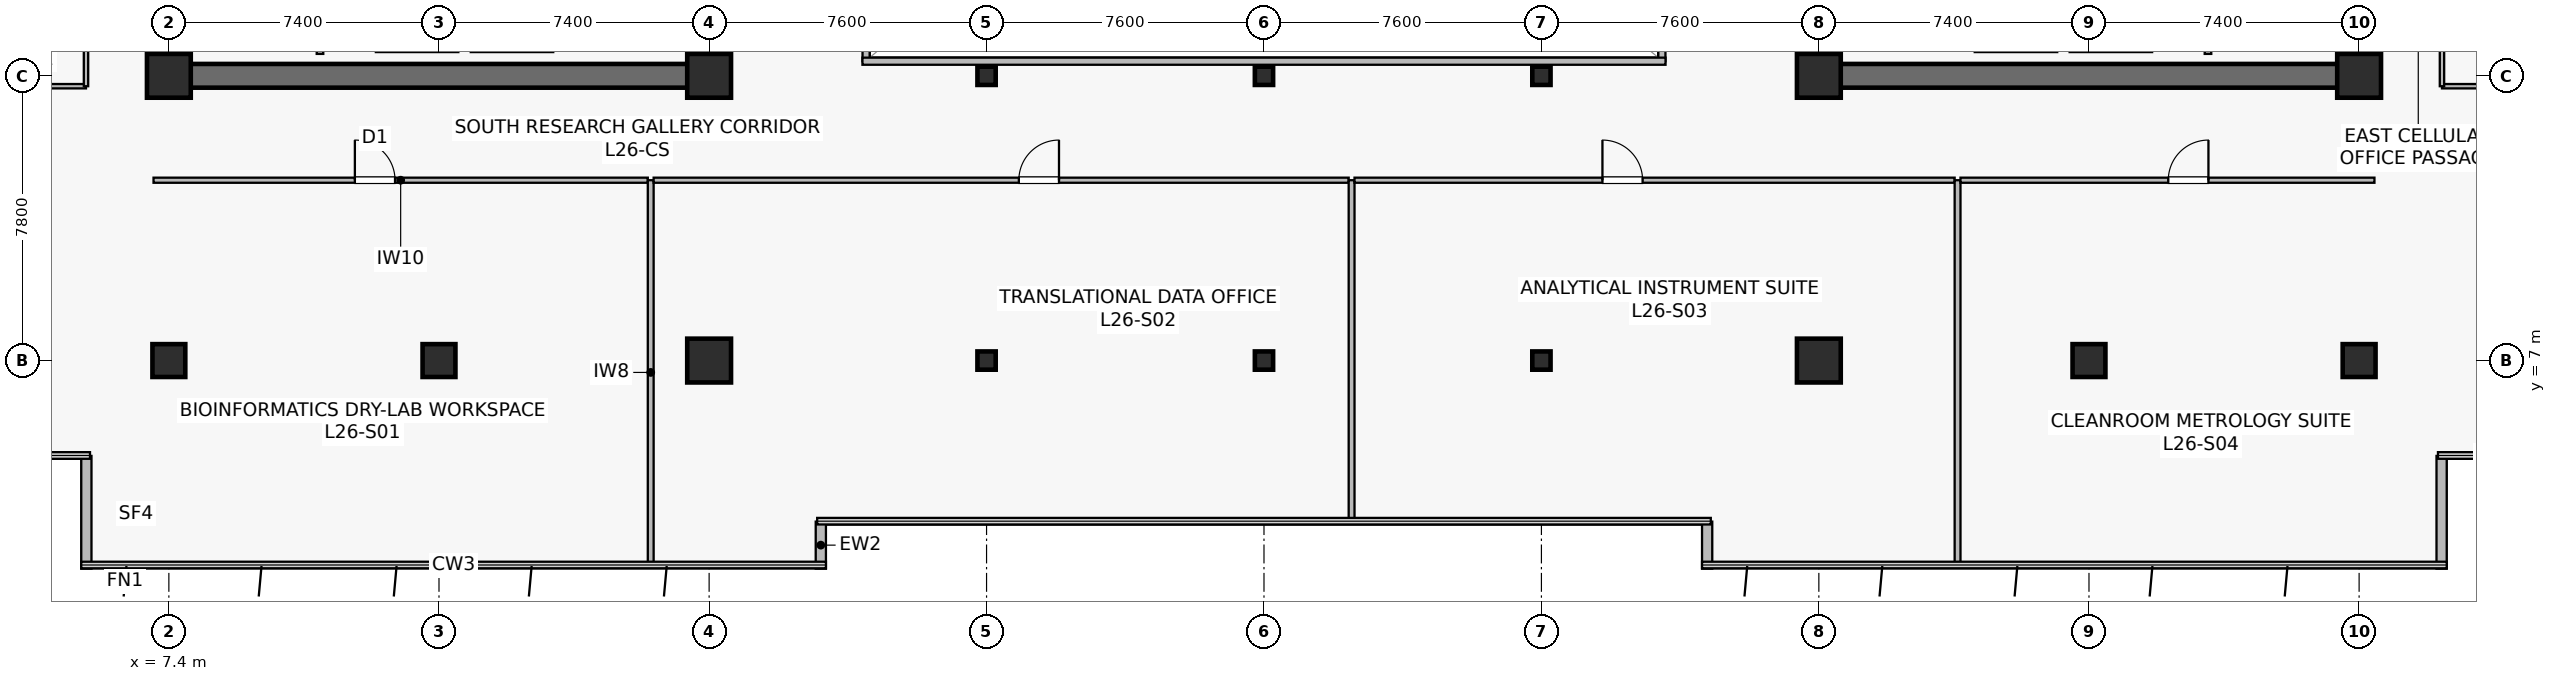
"""IFC4 building model, lengths in metres.
Left out: names, types, materials, properties, quantities, classifications, styles, units other than length and angle.
Written with IfcOpenShell. Run it as: python <this file> out.ifc"""

import sys

from ifc_helpers import new_model, si_unit, direction, frame, frame_2d, origin, origin_2d, place, context, subcontext, project, spatial, rectangle, hollow_rectangle, extrude, source, transform, mapped, element, fill, save


model = new_model("IFC4")
c1 = context("Model", 3, precision=1e-05, world=origin(), true_north=direction((0.0, 1.0)))
c2 = subcontext(c1, "Body", "Model", "MODEL_VIEW")
j1 = project(units=[si_unit("LENGTHUNIT", "METRE"), si_unit("PLANEANGLEUNIT", "RADIAN")], contexts=[c1])
p1 = place(None, origin())
s1 = spatial("IfcSite", under=j1, at=p1, CompositionType="ELEMENT")
p2 = place(p1, origin())
s2 = spatial("IfcBuilding", under=s1, at=p2, CompositionType="ELEMENT")
p3 = place(p2, frame((0.0, 0.0, 109.2)))
s3 = spatial("IfcBuildingStorey", under=s2, at=p3, CompositionType="ELEMENT", Elevation=109.2)
p4 = place(p3, frame((7.075, 14.8, 0.0), z_axis=(0.0, 0.0, 1.0), x_axis=(1.0, 0.0, 0.0)))
e1 = element("IfcWall", 1, at=p4, inside=s3, PredefinedType="SHEAR", context=c2, shape_type="SweptSolid", body=[
    extrude(rectangle(XDim=15.45, YDim=0.65, at=frame_2d((7.725, 0.0))), origin(), (0.0, 0.0, 1.0), 3.79),
])
p5 = place(p3, frame((7.4, 15.125, 0.0), z_axis=(0.0, 0.0, 1.0), x_axis=(0.0, 1.0, 0.0)))
e2 = element("IfcWall", 2, at=p5, inside=s3, PredefinedType="SHEAR", context=c2, shape_type="SweptSolid", body=[
    extrude(rectangle(XDim=18.35, YDim=0.65, at=frame_2d((9.175, 0.0))), origin(), (0.0, 0.0, 1.0), 3.79),
])
p6 = place(p3, frame((22.2, 15.125, 0.0), z_axis=(0.0, 0.0, 1.0), x_axis=(0.0, 1.0, 0.0)))
e3 = element("IfcWall", 3, at=p6, inside=s3, PredefinedType="SHEAR", context=c2, shape_type="SweptSolid", body=[
    extrude(rectangle(XDim=18.35, YDim=0.65, at=frame_2d((9.175, 0.0))), origin(), (0.0, 0.0, 1.0), 3.79),
])
p7 = place(p6, frame((3.425, 0.0, 0.0)))
e4 = element("IfcOpeningElement", 4, at=p7, cuts=e3, PredefinedType="OPENING", context=c2, shape_type="SweptSolid", body=[
    extrude(rectangle(XDim=1.42, YDim=2.2, at=frame_2d((0.71, 1.1))), frame((0.0, 0.335, 0.0), z_axis=(0.0, -1.0, 0.0), x_axis=(1.0, 0.0, 0.0)), (0.0, 0.0, 1.0), 0.67),
])
p8 = place(p3, frame((52.275, 14.8, 0.0), z_axis=(0.0, 0.0, 1.0), x_axis=(1.0, 0.0, 0.0)))
e5 = element("IfcWall", 5, at=p8, inside=s3, PredefinedType="SHEAR", context=c2, shape_type="SweptSolid", body=[
    extrude(rectangle(XDim=15.45, YDim=0.65, at=frame_2d((7.725, 0.0))), origin(), (0.0, 0.0, 1.0), 3.79),
])
p9 = place(p3, frame((52.6, 15.125, 0.0), z_axis=(0.0, 0.0, 1.0), x_axis=(0.0, 1.0, 0.0)))
e6 = element("IfcWall", 6, at=p9, inside=s3, PredefinedType="SHEAR", context=c2, shape_type="SweptSolid", body=[
    extrude(rectangle(XDim=18.35, YDim=0.65, at=frame_2d((9.175, 0.0))), origin(), (0.0, 0.0, 1.0), 3.79),
])
p10 = place(p9, frame((3.425, 0.0, 0.0)))
e7 = element("IfcOpeningElement", 7, at=p10, cuts=e6, PredefinedType="OPENING", context=c2, shape_type="SweptSolid", body=[
    extrude(rectangle(XDim=1.42, YDim=2.2, at=frame_2d((0.71, 1.1))), frame((0.0, 0.335, 0.0), z_axis=(0.0, -1.0, 0.0), x_axis=(1.0, 0.0, 0.0)), (0.0, 0.0, 1.0), 0.67),
])
p11 = place(p3, frame((67.4, 15.125, 0.0), z_axis=(0.0, 0.0, 1.0), x_axis=(0.0, 1.0, 0.0)))
e8 = element("IfcWall", 8, at=p11, inside=s3, PredefinedType="SHEAR", context=c2, shape_type="SweptSolid", body=[
    extrude(rectangle(XDim=18.35, YDim=0.65, at=frame_2d((9.175, 0.0))), origin(), (0.0, 0.0, 1.0), 3.79),
])
m1 = source(origin(), c2, "Body", "SweptSolid", [
    extrude(rectangle(XDim=0.9, YDim=0.9, at=origin_2d()), origin(), (0.0, 0.0, 1.0), 4.1),
])
p12 = place(p3, frame((14.8, 7.0, 0.0), z_axis=(0.0, 0.0, 1.0), x_axis=(1.0, 0.0, 0.0)))
e9 = element("IfcColumn", 9, at=p12, inside=s3, PredefinedType="COLUMN", context=c2, shape_type="MappedRepresentation", body=[
    mapped(m1, transform((0.0, 0.0, 0.0), scale=1.0)),
])
m2 = source(origin(), c2, "Body", "SweptSolid", [
    extrude(rectangle(XDim=1.2, YDim=1.2, at=origin_2d()), origin(), (0.0, 0.0, 1.0), 4.1),
])
for number, where, z_axis, x_axis in (
    (10, (22.2, 7.0, 0.0), (0.0, 0.0, 1.0), (1.0, 0.0, 0.0)),
    (11, (7.4, 14.8, 0.0), (0.0, 0.0, 1.0), (1.0, 0.0, 0.0)),
    (12, (22.2, 14.8, 0.0), (0.0, 0.0, 1.0), (1.0, 0.0, 0.0)),
    (13, (52.6, 7.0, 0.0), (0.0, 0.0, 1.0), (1.0, 0.0, 0.0)),
):
    element("IfcColumn", number, at=place(p3, frame(where, z_axis=z_axis, x_axis=x_axis)), inside=s3, PredefinedType="COLUMN", context=c2, shape_type="MappedRepresentation", body=[
        mapped(m2, transform((0.0, 0.0, 0.0), scale=1.0)),
    ])
p13 = place(p3, frame((60.0, 7.0, 0.0), z_axis=(0.0, 0.0, 1.0), x_axis=(1.0, 0.0, 0.0)))
e14 = element("IfcColumn", 14, at=p13, inside=s3, PredefinedType="COLUMN", context=c2, shape_type="MappedRepresentation", body=[
    mapped(m1, transform((0.0, 0.0, 0.0), scale=1.0)),
])
for number, where, z_axis, x_axis in (
    (15, (52.6, 14.8, 0.0), (0.0, 0.0, 1.0), (1.0, 0.0, 0.0)),
    (16, (67.4, 14.8, 0.0), (0.0, 0.0, 1.0), (1.0, 0.0, 0.0)),
):
    element("IfcColumn", number, at=place(p3, frame(where, z_axis=z_axis, x_axis=x_axis)), inside=s3, PredefinedType="COLUMN", context=c2, shape_type="MappedRepresentation", body=[
        mapped(m2, transform((0.0, 0.0, 0.0), scale=1.0)),
    ])
for number, where, z_axis, x_axis in (
    (17, (7.4, 7.0, 0.0), (0.0, 0.0, 1.0), (1.0, 0.0, 0.0)),
    (18, (67.4, 7.0, 0.0), (0.0, 0.0, 1.0), (1.0, 0.0, 0.0)),
):
    element("IfcColumn", number, at=place(p3, frame(where, z_axis=z_axis, x_axis=x_axis)), inside=s3, PredefinedType="COLUMN", context=c2, shape_type="MappedRepresentation", body=[
        mapped(m1, transform((0.0, 0.0, 0.0), scale=1.0)),
    ])
m3 = source(origin(), c2, "Body", "SweptSolid", [
    extrude(hollow_rectangle(XDim=0.5, YDim=0.5, WallThickness=0.022, at=origin_2d()), origin(), (0.0, 0.0, 1.0), 4.1),
])
for number, where, z_axis, x_axis in (
    (19, (29.8, 7.0, 0.0), (0.0, 0.0, 1.0), (1.0, 0.0, 0.0)),
    (20, (29.8, 14.8, 0.0), (0.0, 0.0, 1.0), (1.0, 0.0, 0.0)),
    (21, (37.4, 7.0, 0.0), (0.0, 0.0, 1.0), (1.0, 0.0, 0.0)),
    (22, (37.4, 14.8, 0.0), (0.0, 0.0, 1.0), (1.0, 0.0, 0.0)),
    (23, (45.0, 7.0, 0.0), (0.0, 0.0, 1.0), (1.0, 0.0, 0.0)),
    (24, (45.0, 14.8, 0.0), (0.0, 0.0, 1.0), (1.0, 0.0, 0.0)),
):
    element("IfcColumn", number, at=place(p3, frame(where, z_axis=z_axis, x_axis=x_axis)), inside=s3, PredefinedType="COLUMN", context=c2, shape_type="MappedRepresentation", body=[
        mapped(m3, transform((0.0, 0.0, 0.0), scale=1.0)),
    ])
for number, where, z_axis, x_axis in (
    (25, (25.26, 1.3, 0.0), (0.0, 0.0, 1.0), (0.0, 1.0, 0.0)),
    (26, (49.54, 2.588, 0.0), (0.0, 0.0, 1.0), (0.0, -1.0, 0.0)),
):
    element("IfcWall", number, at=place(p3, frame(where, z_axis=z_axis, x_axis=x_axis)), inside=s3, PredefinedType="STANDARD", context=c2, shape_type="SweptSolid", body=[
        extrude(rectangle(XDim=1.288, YDim=0.28, at=frame_2d((0.644, 0.0))), origin(), (0.0, 0.0, 1.0), 3.79),
    ])
for number, where, z_axis, x_axis in (
    (27, (69.66, 1.3, 0.0), (0.0, 0.0, 1.0), (0.0, 1.0, 0.0)),
    (28, (5.14, 4.388, 0.0), (0.0, 0.0, 1.0), (0.0, -1.0, 0.0)),
):
    element("IfcWall", number, at=place(p3, frame(where, z_axis=z_axis, x_axis=x_axis)), inside=s3, PredefinedType="STANDARD", context=c2, shape_type="SweptSolid", body=[
        extrude(rectangle(XDim=3.088, YDim=0.28, at=frame_2d((1.544, 0.0))), origin(), (0.0, 0.0, 1.0), 3.79),
    ])
p14 = place(p3, frame((13.07, 15.55, 0.0), z_axis=(0.0, 0.0, 1.0), x_axis=(1.0, 0.0, 0.0)))
e29 = element("IfcWall", 29, at=p14, inside=s3, PredefinedType="SOLIDWALL", context=c2, shape_type="SweptSolid", body=[
    extrude(rectangle(XDim=2.26, YDim=0.2, at=frame_2d((1.13, 0.0))), origin(), (0.0, 0.0, 1.0), 3.125),
])
p15 = place(p3, frame((15.67, 15.55, 0.0), z_axis=(0.0, 0.0, 1.0), x_axis=(1.0, 0.0, 0.0)))
e30 = element("IfcWall", 30, at=p15, inside=s3, PredefinedType="SOLIDWALL", context=c2, shape_type="SweptSolid", body=[
    extrude(rectangle(XDim=2.26, YDim=0.2, at=frame_2d((1.13, 0.0))), origin(), (0.0, 0.0, 1.0), 3.79),
])
p16 = place(p3, frame((11.54, 15.4, 0.0), z_axis=(0.0, 0.0, 1.0), x_axis=(0.0, 1.0, 0.0)))
e31 = element("IfcWall", 31, at=p16, inside=s3, PredefinedType="SOLIDWALL", context=c2, shape_type="SweptSolid", body=[
    extrude(rectangle(XDim=2.4, YDim=0.18, at=frame_2d((1.2, 0.0))), origin(), (0.0, 0.0, 1.0), 3.79),
])
p17 = place(p3, frame((59.47, 15.55, 0.0), z_axis=(0.0, 0.0, 1.0), x_axis=(1.0, 0.0, 0.0)))
e32 = element("IfcWall", 32, at=p17, inside=s3, PredefinedType="SOLIDWALL", context=c2, shape_type="SweptSolid", body=[
    extrude(rectangle(XDim=2.26, YDim=0.2, at=frame_2d((1.13, 0.0))), origin(), (0.0, 0.0, 1.0), 3.125),
])
p18 = place(p3, frame((56.87, 15.55, 0.0), z_axis=(0.0, 0.0, 1.0), x_axis=(1.0, 0.0, 0.0)))
e33 = element("IfcWall", 33, at=p18, inside=s3, PredefinedType="SOLIDWALL", context=c2, shape_type="SweptSolid", body=[
    extrude(rectangle(XDim=2.26, YDim=0.2, at=frame_2d((1.13, 0.0))), origin(), (0.0, 0.0, 1.0), 3.79),
])
p19 = place(p3, frame((63.26, 15.4, 0.0), z_axis=(0.0, 0.0, 1.0), x_axis=(0.0, 1.0, 0.0)))
e34 = element("IfcWall", 34, at=p19, inside=s3, PredefinedType="SOLIDWALL", context=c2, shape_type="SweptSolid", body=[
    extrude(rectangle(XDim=2.4, YDim=0.18, at=frame_2d((1.2, 0.0))), origin(), (0.0, 0.0, 1.0), 3.79),
])
p20 = place(p3, frame((26.5, 15.2, 0.0), z_axis=(0.0, 0.0, 1.0), x_axis=(0.0, 1.0, 0.0)))
e35 = element("IfcWall", 35, at=p20, inside=s3, PredefinedType="SOLIDWALL", context=c2, shape_type="SweptSolid", body=[
    extrude(rectangle(XDim=18.2, YDim=0.195, at=frame_2d((9.1, 0.0))), origin(), (0.0, 0.0, 1.0), 3.79),
])
p21 = place(p20, frame((1.8, 0.0, 0.9)))
e36 = element("IfcOpeningElement", 36, at=p21, cuts=e35, PredefinedType="OPENING", context=c2, shape_type="SweptSolid", body=[
    extrude(rectangle(XDim=1.5, YDim=1.4, at=frame_2d((0.75, 0.7))), frame((0.0, 0.107, 0.0), z_axis=(0.0, -1.0, 0.0), x_axis=(1.0, 0.0, 0.0)), (0.0, 0.0, 1.0), 0.215),
])
p22 = place(p20, frame((13.2, 0.0, 0.9)))
e37 = element("IfcOpeningElement", 37, at=p22, cuts=e35, PredefinedType="OPENING", context=c2, shape_type="SweptSolid", body=[
    extrude(rectangle(XDim=1.5, YDim=1.4, at=frame_2d((0.75, 0.7))), frame((0.0, 0.107, 0.0), z_axis=(0.0, -1.0, 0.0), x_axis=(1.0, 0.0, 0.0)), (0.0, 0.0, 1.0), 0.215),
])
p23 = place(p3, frame((48.3, 15.2, 0.0), z_axis=(0.0, 0.0, 1.0), x_axis=(0.0, 1.0, 0.0)))
e38 = element("IfcWall", 38, at=p23, inside=s3, PredefinedType="SOLIDWALL", context=c2, shape_type="SweptSolid", body=[
    extrude(rectangle(XDim=18.2, YDim=0.195, at=frame_2d((9.1, 0.0))), origin(), (0.0, 0.0, 1.0), 3.79),
])
p24 = place(p23, frame((1.8, 0.0, 0.9)))
e39 = element("IfcOpeningElement", 39, at=p24, cuts=e38, PredefinedType="OPENING", context=c2, shape_type="SweptSolid", body=[
    extrude(rectangle(XDim=1.5, YDim=1.4, at=frame_2d((0.75, 0.7))), frame((0.0, 0.107, 0.0), z_axis=(0.0, -1.0, 0.0), x_axis=(1.0, 0.0, 0.0)), (0.0, 0.0, 1.0), 0.215),
])
p25 = place(p23, frame((13.2, 0.0, 0.9)))
e40 = element("IfcOpeningElement", 40, at=p25, cuts=e38, PredefinedType="OPENING", context=c2, shape_type="SweptSolid", body=[
    extrude(rectangle(XDim=1.5, YDim=1.4, at=frame_2d((0.75, 0.7))), frame((0.0, 0.107, 0.0), z_axis=(0.0, -1.0, 0.0), x_axis=(1.0, 0.0, 0.0)), (0.0, 0.0, 1.0), 0.215),
])
p26 = place(p3, frame((26.4, 15.2, 0.0), z_axis=(0.0, 0.0, 1.0), x_axis=(1.0, 0.0, 0.0)))
e41 = element("IfcWall", 41, at=p26, inside=s3, PredefinedType="SOLIDWALL", context=c2, shape_type="SweptSolid", body=[
    extrude(rectangle(XDim=22.0, YDim=0.195, at=frame_2d((11.0, 0.0))), origin(), (0.0, 0.0, 1.0), 3.79),
])
p27 = place(p3, frame((6.98, 11.94, 0.0), z_axis=(0.0, 0.0, 1.0), x_axis=(1.0, 0.0, 0.0)))
e42 = element("IfcWall", 42, at=p27, inside=s3, PredefinedType="PARTITIONING", context=c2, shape_type="SweptSolid", body=[
    extrude(rectangle(XDim=13.54, YDim=0.14, at=frame_2d((6.77, 0.0))), origin(), (0.0, 0.0, 1.0), 3.125),
])
p28 = place(p27, frame((5.516, 0.0, 0.0)))
e43 = element("IfcOpeningElement", 43, at=p28, cuts=e42, PredefinedType="OPENING", context=c2, shape_type="SweptSolid", body=[
    extrude(rectangle(XDim=1.1, YDim=2.18, at=frame_2d((0.55, 1.09))), frame((0.0, 0.08, 0.0), z_axis=(0.0, -1.0, 0.0), x_axis=(1.0, 0.0, 0.0)), (0.0, 0.0, 1.0), 0.16),
])
p29 = place(p3, frame((20.6, 1.41, 0.0), z_axis=(0.0, 0.0, 1.0), x_axis=(0.0, 1.0, 0.0)))
e44 = element("IfcWall", 44, at=p29, inside=s3, PredefinedType="PARTITIONING", context=c2, shape_type="SweptSolid", body=[
    extrude(rectangle(XDim=10.53, YDim=0.16, at=frame_2d((5.265, 0.0))), origin(), (0.0, 0.0, 1.0), 3.075),
])
p30 = place(p3, frame((20.68, 11.94, 0.0), z_axis=(0.0, 0.0, 1.0), x_axis=(1.0, 0.0, 0.0)))
e45 = element("IfcWall", 45, at=p30, inside=s3, PredefinedType="PARTITIONING", context=c2, shape_type="SweptSolid", body=[
    extrude(rectangle(XDim=19.04, YDim=0.14, at=frame_2d((9.52, 0.0))), origin(), (0.0, 0.0, 1.0), 3.125),
])
p31 = place(p30, frame((10.004, 0.0, 0.0)))
e46 = element("IfcOpeningElement", 46, at=p31, cuts=e45, PredefinedType="OPENING", context=c2, shape_type="SweptSolid", body=[
    extrude(rectangle(XDim=1.1, YDim=2.18, at=frame_2d((0.55, 1.09))), frame((0.0, 0.08, 0.0), z_axis=(0.0, -1.0, 0.0), x_axis=(1.0, 0.0, 0.0)), (0.0, 0.0, 1.0), 0.16),
])
p32 = place(p3, frame((39.8, 2.61, 0.0), z_axis=(0.0, 0.0, 1.0), x_axis=(0.0, 1.0, 0.0)))
e47 = element("IfcWall", 47, at=p32, inside=s3, PredefinedType="PARTITIONING", context=c2, shape_type="SweptSolid", body=[
    extrude(rectangle(XDim=9.33, YDim=0.16, at=frame_2d((4.665, 0.0))), origin(), (0.0, 0.0, 1.0), 3.075),
])
p33 = place(p3, frame((39.88, 11.94, 0.0), z_axis=(0.0, 0.0, 1.0), x_axis=(1.0, 0.0, 0.0)))
e48 = element("IfcWall", 48, at=p33, inside=s3, PredefinedType="PARTITIONING", context=c2, shape_type="SweptSolid", body=[
    extrude(rectangle(XDim=16.44, YDim=0.14, at=frame_2d((8.22, 0.0))), origin(), (0.0, 0.0, 1.0), 3.125),
])
p34 = place(p33, frame((6.792, 0.0, 0.0)))
e49 = element("IfcOpeningElement", 49, at=p34, cuts=e48, PredefinedType="OPENING", context=c2, shape_type="SweptSolid", body=[
    extrude(rectangle(XDim=1.1, YDim=2.18, at=frame_2d((0.55, 1.09))), frame((0.0, 0.08, 0.0), z_axis=(0.0, -1.0, 0.0), x_axis=(1.0, 0.0, 0.0)), (0.0, 0.0, 1.0), 0.16),
])
p35 = place(p3, frame((56.4, 1.41, 0.0), z_axis=(0.0, 0.0, 1.0), x_axis=(0.0, 1.0, 0.0)))
e50 = element("IfcWall", 50, at=p35, inside=s3, PredefinedType="PARTITIONING", context=c2, shape_type="SweptSolid", body=[
    extrude(rectangle(XDim=10.53, YDim=0.16, at=frame_2d((5.265, 0.0))), origin(), (0.0, 0.0, 1.0), 3.075),
])
p36 = place(p3, frame((56.48, 11.94, 0.0), z_axis=(0.0, 0.0, 1.0), x_axis=(1.0, 0.0, 0.0)))
e51 = element("IfcWall", 51, at=p36, inside=s3, PredefinedType="PARTITIONING", context=c2, shape_type="SweptSolid", body=[
    extrude(rectangle(XDim=11.34, YDim=0.14, at=frame_2d((5.67, 0.0))), origin(), (0.0, 0.0, 1.0), 3.125),
])
p37 = place(p36, frame((5.692, 0.0, 0.0)))
e52 = element("IfcOpeningElement", 52, at=p37, cuts=e51, PredefinedType="OPENING", context=c2, shape_type="SweptSolid", body=[
    extrude(rectangle(XDim=1.1, YDim=2.18, at=frame_2d((0.55, 1.09))), frame((0.0, 0.08, 0.0), z_axis=(0.0, -1.0, 0.0), x_axis=(1.0, 0.0, 0.0)), (0.0, 0.0, 1.0), 0.16),
])
p38 = place(p3, frame((2.11, 14.515, 0.0), z_axis=(0.0, 0.0, 1.0), x_axis=(1.0, 0.0, 0.0)))
e53 = element("IfcWall", 53, at=p38, inside=s3, PredefinedType="PARTITIONING", context=c2, shape_type="SweptSolid", body=[
    extrude(rectangle(XDim=3.02, YDim=0.12, at=frame_2d((1.51, 0.0))), origin(), (0.0, 0.0, 1.0), 3.79),
])
p39 = place(p3, frame((5.13, 14.515, 0.0), z_axis=(0.0, 0.0, 1.0), x_axis=(0.0, 1.0, 0.0)))
e54 = element("IfcWall", 54, at=p39, inside=s3, PredefinedType="PARTITIONING", context=c2, shape_type="SweptSolid", body=[
    extrude(rectangle(XDim=6.225, YDim=0.12, at=frame_2d((3.113, 0.0))), origin(), (0.0, 0.0, 1.0), 3.79),
])
p40 = place(p39, frame((2.663, 0.0, 0.0)))
e55 = element("IfcOpeningElement", 55, at=p40, cuts=e54, PredefinedType="OPENING", context=c2, shape_type="SweptSolid", body=[
    extrude(rectangle(XDim=0.9, YDim=2.1, at=frame_2d((0.45, 1.05))), frame((0.0, 0.07, 0.0), z_axis=(0.0, -1.0, 0.0), x_axis=(1.0, 0.0, 0.0)), (0.0, 0.0, 1.0), 0.14),
])
p41 = place(p3, frame((69.67, 14.515, 0.0), z_axis=(0.0, 0.0, 1.0), x_axis=(1.0, 0.0, 0.0)))
e56 = element("IfcWall", 56, at=p41, inside=s3, PredefinedType="PARTITIONING", context=c2, shape_type="SweptSolid", body=[
    extrude(rectangle(XDim=3.02, YDim=0.12, at=frame_2d((1.51, 0.0))), origin(), (0.0, 0.0, 1.0), 3.79),
])
p42 = place(p3, frame((69.67, 14.515, 0.0), z_axis=(0.0, 0.0, 1.0), x_axis=(0.0, 1.0, 0.0)))
e57 = element("IfcWall", 57, at=p42, inside=s3, PredefinedType="PARTITIONING", context=c2, shape_type="SweptSolid", body=[
    extrude(rectangle(XDim=10.425, YDim=0.12, at=frame_2d((5.212, 0.0))), origin(), (0.0, 0.0, 1.0), 3.79),
])
p43 = place(p42, frame((4.762, 0.0, 0.0)))
e58 = element("IfcOpeningElement", 58, at=p43, cuts=e57, PredefinedType="OPENING", context=c2, shape_type="SweptSolid", body=[
    extrude(rectangle(XDim=0.9, YDim=2.1, at=frame_2d((0.45, 1.05))), frame((0.0, 0.07, 0.0), z_axis=(0.0, -1.0, 0.0), x_axis=(1.0, 0.0, 0.0)), (0.0, 0.0, 1.0), 0.14),
])
m4 = source(origin(), c2, "Body", "SweptSolid", [
    extrude(rectangle(XDim=1.1, YDim=2.18, at=frame_2d((0.55, 1.09))), frame((0.0, 0.025, 0.0), z_axis=(0.0, -1.0, 0.0), x_axis=(1.0, 0.0, 0.0)), (0.0, 0.0, 1.0), 0.05),
])
p44 = place(p28, origin())
e59 = element("IfcDoor", 59, at=p44, inside=s3, OperationType="SINGLE_SWING_LEFT", PredefinedType="DOOR", context=c2, shape_type="MappedRepresentation", body=[
    mapped(m4, transform((0.0, 0.0, 0.0), scale=1.0)),
])
fill(e43, e59)
p45 = place(p31, origin())
e60 = element("IfcDoor", 60, at=p45, inside=s3, OperationType="SINGLE_SWING_RIGHT", PredefinedType="DOOR", context=c2, shape_type="MappedRepresentation", body=[
    mapped(m4, transform((0.0, 0.0, 0.0), scale=1.0)),
])
fill(e46, e60)
p46 = place(p34, origin())
e61 = element("IfcDoor", 61, at=p46, inside=s3, OperationType="SINGLE_SWING_LEFT", PredefinedType="DOOR", context=c2, shape_type="MappedRepresentation", body=[
    mapped(m4, transform((0.0, 0.0, 0.0), scale=1.0)),
])
fill(e49, e61)
p47 = place(p37, origin())
e62 = element("IfcDoor", 62, at=p47, inside=s3, OperationType="SINGLE_SWING_RIGHT", PredefinedType="DOOR", context=c2, shape_type="MappedRepresentation", body=[
    mapped(m4, transform((0.0, 0.0, 0.0), scale=1.0)),
])
fill(e52, e62)
save(model, sys.argv[1])
